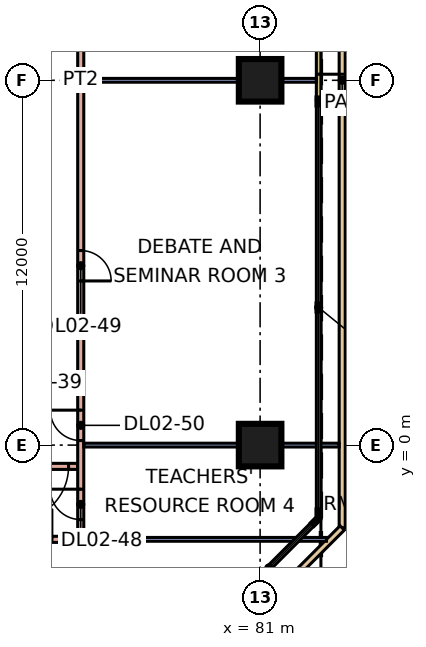
"""IFC4 building model, lengths in metres.
Left out: names, types, materials, properties, quantities, classifications, styles, units other than length and angle.
Written with IfcOpenShell. Run it as: python <this file> out.ifc"""

import sys

from ifc_helpers import new_model, si_unit, direction, frame, frame_2d, origin, origin_2d, place, context, subcontext, project, spatial, rectangle, extrude, element, fill, save


model = new_model("IFC4")
c1 = context("Model", 3, precision=1e-05, world=origin(), true_north=direction((0.0, 1.0)))
c2 = subcontext(c1, "Body", "Model", "MODEL_VIEW")
j1 = project(units=[si_unit("LENGTHUNIT", "METRE"), si_unit("PLANEANGLEUNIT", "RADIAN")], contexts=[c1])
p1 = place(None, origin())
s1 = spatial("IfcSite", under=j1, at=p1, CompositionType="ELEMENT")
p2 = place(p1, origin())
s2 = spatial("IfcBuilding", under=s1, at=p2, CompositionType="ELEMENT")
p3 = place(p2, frame((0.0, 0.0, 12.0)))
s3 = spatial("IfcBuildingStorey", under=s2, at=p3, CompositionType="ELEMENT", Elevation=12.0)
for number, where, z_axis, x_axis in (
    (1, (81.0, 0.0, 0.0), (0.0, 0.0, 1.0), (1.0, 0.0, 0.0)),
    (2, (81.0, 12.0, 0.0), (0.0, 0.0, 1.0), (1.0, 0.0, 0.0)),
):
    element("IfcColumn", number, at=place(p3, frame(where, z_axis=z_axis, x_axis=x_axis)), inside=s3, PredefinedType="COLUMN", context=c2, shape_type="SweptSolid", body=[
        extrude(rectangle(XDim=1.4, YDim=1.4, at=origin_2d()), origin(), (0.0, 0.0, 1.0), 4.8),
    ])
p4 = place(p3, frame((82.925, 11.35, 0.0), z_axis=(0.0, 0.0, 1.0), x_axis=(0.0, 1.0, 0.0)))
e3 = element("IfcWall", 3, at=p4, inside=s3, PredefinedType="SOLIDWALL", context=c2, shape_type="SweptSolid", body=[
    extrude(rectangle(XDim=3.0, YDim=0.15, at=frame_2d((1.5, 0.0))), origin(), (0.0, 0.0, 1.0), 4.4),
])
p5 = place(p4, frame((0.85, 0.0, 0.0)))
e4 = element("IfcOpeningElement", 4, at=p5, cuts=e3, PredefinedType="OPENING", context=c2, shape_type="SweptSolid", body=[
    extrude(rectangle(XDim=1.8, YDim=2.4, at=frame_2d((0.9, 1.2))), frame((0.0, 0.085, 0.0), z_axis=(0.0, -1.0, 0.0), x_axis=(1.0, 0.0, 0.0)), (0.0, 0.0, 1.0), 0.17),
])
p6 = place(p3, frame((83.7, 26.725, 0.0), z_axis=(0.0, 0.0, 1.0), x_axis=(0.0, -1.0, 0.0)))
e5 = element("IfcWall", 5, at=p6, inside=s3, PredefinedType="PARAPET", context=c2, shape_type="SweptSolid", body=[
    extrude(rectangle(XDim=29.45, YDim=0.2, at=frame_2d((14.725, 0.0))), origin(), (0.0, 0.0, 1.0), 0.5),
])
p7 = place(p3, frame((83.7, -2.725, 0.0), z_axis=(0.0, 0.0, 1.0), x_axis=(-0.707106781187, -0.707106781187, 0.0)))
e6 = element("IfcWall", 6, at=p7, inside=s3, PredefinedType="PARAPET", context=c2, shape_type="SweptSolid", body=[
    extrude(rectangle(XDim=12.692, YDim=0.2, at=frame_2d((6.346, 0.0))), origin(), (0.0, 0.0, 1.0), 0.5),
])
p8 = place(p3, frame((-0.184, -3.1, 0.0), z_axis=(0.0, 0.0, 1.0), x_axis=(1.0, 0.0, 0.0)))
e7 = element("IfcWall", 7, at=p8, inside=s3, PredefinedType="PARTITIONING", context=c2, shape_type="SweptSolid", body=[
    extrude(rectangle(XDim=75.284, YDim=0.2, at=frame_2d((37.642, 0.0))), origin(), (0.0, 0.0, 1.0), 4.4),
])
p9 = place(p8, frame((6.105, 0.0, 0.0)))
e8 = element("IfcOpeningElement", 8, at=p9, cuts=e7, PredefinedType="OPENING", context=c2, shape_type="SweptSolid", body=[
    extrude(rectangle(XDim=1.0, YDim=2.1, at=frame_2d((0.5, 1.05))), frame((0.0, 0.11, 0.0), z_axis=(0.0, -1.0, 0.0), x_axis=(1.0, 0.0, 0.0)), (0.0, 0.0, 1.0), 0.22),
])
p10 = place(p8, frame((17.584, 0.0, 0.0)))
e9 = element("IfcOpeningElement", 9, at=p10, cuts=e7, PredefinedType="OPENING", context=c2, shape_type="SweptSolid", body=[
    extrude(rectangle(XDim=1.0, YDim=2.1, at=frame_2d((0.5, 1.05))), frame((0.0, 0.11, 0.0), z_axis=(0.0, -1.0, 0.0), x_axis=(1.0, 0.0, 0.0)), (0.0, 0.0, 1.0), 0.22),
])
p11 = place(p8, frame((12.334, 0.0, 0.0)))
e10 = element("IfcOpeningElement", 10, at=p11, cuts=e7, PredefinedType="OPENING", context=c2, shape_type="SweptSolid", body=[
    extrude(rectangle(XDim=1.0, YDim=2.1, at=frame_2d((0.5, 1.05))), frame((0.0, 0.11, 0.0), z_axis=(0.0, -1.0, 0.0), x_axis=(1.0, 0.0, 0.0)), (0.0, 0.0, 1.0), 0.22),
])
p12 = place(p8, frame((29.584, 0.0, 0.0)))
e11 = element("IfcOpeningElement", 11, at=p12, cuts=e7, PredefinedType="OPENING", context=c2, shape_type="SweptSolid", body=[
    extrude(rectangle(XDim=1.0, YDim=2.1, at=frame_2d((0.5, 1.05))), frame((0.0, 0.11, 0.0), z_axis=(0.0, -1.0, 0.0), x_axis=(1.0, 0.0, 0.0)), (0.0, 0.0, 1.0), 0.22),
])
p13 = place(p8, frame((24.334, 0.0, 0.0)))
e12 = element("IfcOpeningElement", 12, at=p13, cuts=e7, PredefinedType="OPENING", context=c2, shape_type="SweptSolid", body=[
    extrude(rectangle(XDim=1.0, YDim=2.1, at=frame_2d((0.5, 1.05))), frame((0.0, 0.11, 0.0), z_axis=(0.0, -1.0, 0.0), x_axis=(1.0, 0.0, 0.0)), (0.0, 0.0, 1.0), 0.22),
])
p14 = place(p8, frame((40.084, 0.0, 0.0)))
e13 = element("IfcOpeningElement", 13, at=p14, cuts=e7, PredefinedType="OPENING", context=c2, shape_type="SweptSolid", body=[
    extrude(rectangle(XDim=1.0, YDim=2.1, at=frame_2d((0.5, 1.05))), frame((0.0, 0.11, 0.0), z_axis=(0.0, -1.0, 0.0), x_axis=(1.0, 0.0, 0.0)), (0.0, 0.0, 1.0), 0.22),
])
p15 = place(p8, frame((49.084, 0.0, 0.0)))
e14 = element("IfcOpeningElement", 14, at=p15, cuts=e7, PredefinedType="OPENING", context=c2, shape_type="SweptSolid", body=[
    extrude(rectangle(XDim=1.0, YDim=2.1, at=frame_2d((0.5, 1.05))), frame((0.0, 0.11, 0.0), z_axis=(0.0, -1.0, 0.0), x_axis=(1.0, 0.0, 0.0)), (0.0, 0.0, 1.0), 0.22),
])
p16 = place(p8, frame((58.084, 0.0, 0.0)))
e15 = element("IfcOpeningElement", 15, at=p16, cuts=e7, PredefinedType="OPENING", context=c2, shape_type="SweptSolid", body=[
    extrude(rectangle(XDim=1.0, YDim=2.1, at=frame_2d((0.5, 1.05))), frame((0.0, 0.11, 0.0), z_axis=(0.0, -1.0, 0.0), x_axis=(1.0, 0.0, 0.0)), (0.0, 0.0, 1.0), 0.22),
])
p17 = place(p8, frame((67.084, 0.0, 0.0)))
e16 = element("IfcOpeningElement", 16, at=p17, cuts=e7, PredefinedType="OPENING", context=c2, shape_type="SweptSolid", body=[
    extrude(rectangle(XDim=1.0, YDim=2.1, at=frame_2d((0.5, 1.05))), frame((0.0, 0.11, 0.0), z_axis=(0.0, -1.0, 0.0), x_axis=(1.0, 0.0, 0.0)), (0.0, 0.0, 1.0), 0.22),
])
p18 = place(p8, frame((73.334, 0.0, 0.0)))
e17 = element("IfcOpeningElement", 17, at=p18, cuts=e7, PredefinedType="OPENING", context=c2, shape_type="SweptSolid", body=[
    extrude(rectangle(XDim=1.0, YDim=2.1, at=frame_2d((0.5, 1.05))), frame((0.0, 0.11, 0.0), z_axis=(0.0, -1.0, 0.0), x_axis=(1.0, 0.0, 0.0)), (0.0, 0.0, 1.0), 0.22),
])
p19 = place(p3, frame((54.0, -0.7, 0.0), z_axis=(0.0, 0.0, 1.0), x_axis=(1.0, 0.0, 0.0)))
e18 = element("IfcWall", 18, at=p19, inside=s3, PredefinedType="PARTITIONING", context=c2, shape_type="SweptSolid", body=[
    extrude(rectangle(XDim=21.0, YDim=0.2, at=frame_2d((10.5, 0.0))), origin(), (0.0, 0.0, 1.0), 4.4),
])
p20 = place(p19, frame((4.1, 0.0, 0.0)))
e19 = element("IfcOpeningElement", 19, at=p20, cuts=e18, PredefinedType="OPENING", context=c2, shape_type="SweptSolid", body=[
    extrude(rectangle(XDim=1.0, YDim=2.1, at=frame_2d((0.5, 1.05))), frame((0.0, 0.11, 0.0), z_axis=(0.0, -1.0, 0.0), x_axis=(1.0, 0.0, 0.0)), (0.0, 0.0, 1.0), 0.22),
])
p21 = place(p19, frame((18.9, 0.0, 0.0)))
e20 = element("IfcOpeningElement", 20, at=p21, cuts=e18, PredefinedType="OPENING", context=c2, shape_type="SweptSolid", body=[
    extrude(rectangle(XDim=1.8, YDim=2.1, at=frame_2d((0.9, 1.05))), frame((0.0, 0.11, 0.0), z_axis=(0.0, -1.0, 0.0), x_axis=(1.0, 0.0, 0.0)), (0.0, 0.0, 1.0), 0.22),
])
p22 = place(p3, frame((75.1, -3.1, 0.0), z_axis=(0.0, 0.0, 1.0), x_axis=(1.0, 0.0, 0.0)))
e21 = element("IfcWall", 21, at=p22, inside=s3, PredefinedType="PARTITIONING", context=c2, shape_type="SweptSolid", body=[
    extrude(rectangle(XDim=8.083, YDim=0.125, at=frame_2d((4.042, 0.0))), origin(), (0.0, 0.0, 1.0), 4.4),
])
p23 = place(p3, frame((75.1, -3.0, 0.0), z_axis=(0.0, 0.0, 1.0), x_axis=(0.0, 1.0, 0.0)))
e22 = element("IfcWall", 22, at=p23, inside=s3, PredefinedType="PARTITIONING", context=c2, shape_type="SweptSolid", body=[
    extrude(rectangle(XDim=30.0, YDim=0.2, at=frame_2d((15.0, 0.0))), origin(), (0.0, 0.0, 1.0), 4.4),
])
p24 = place(p23, frame((0.55, 0.0, 0.0)))
e23 = element("IfcOpeningElement", 23, at=p24, cuts=e22, PredefinedType="OPENING", context=c2, shape_type="SweptSolid", body=[
    extrude(rectangle(XDim=1.0, YDim=2.1, at=frame_2d((0.5, 1.05))), frame((0.0, 0.11, 0.0), z_axis=(0.0, -1.0, 0.0), x_axis=(1.0, 0.0, 0.0)), (0.0, 0.0, 1.0), 0.22),
])
p25 = place(p23, frame((8.4, 0.0, 0.0)))
e24 = element("IfcOpeningElement", 24, at=p25, cuts=e22, PredefinedType="OPENING", context=c2, shape_type="SweptSolid", body=[
    extrude(rectangle(XDim=1.0, YDim=2.1, at=frame_2d((0.5, 1.05))), frame((0.0, 0.11, 0.0), z_axis=(0.0, -1.0, 0.0), x_axis=(1.0, 0.0, 0.0)), (0.0, 0.0, 1.0), 0.22),
])
p26 = place(p23, frame((3.15, 0.0, 0.0)))
e25 = element("IfcOpeningElement", 25, at=p26, cuts=e22, PredefinedType="OPENING", context=c2, shape_type="SweptSolid", body=[
    extrude(rectangle(XDim=1.0, YDim=2.1, at=frame_2d((0.5, 1.05))), frame((0.0, 0.11, 0.0), z_axis=(0.0, -1.0, 0.0), x_axis=(1.0, 0.0, 0.0)), (0.0, 0.0, 1.0), 0.22),
])
p27 = place(p23, frame((22.25, 0.0, 0.0)))
e26 = element("IfcOpeningElement", 26, at=p27, cuts=e22, PredefinedType="OPENING", context=c2, shape_type="SweptSolid", body=[
    extrude(rectangle(XDim=1.0, YDim=2.1, at=frame_2d((0.5, 1.05))), frame((0.0, 0.11, 0.0), z_axis=(0.0, -1.0, 0.0), x_axis=(1.0, 0.0, 0.0)), (0.0, 0.0, 1.0), 0.22),
])
p28 = place(p23, frame((18.75, 0.0, 0.0)))
e27 = element("IfcOpeningElement", 27, at=p28, cuts=e22, PredefinedType="OPENING", context=c2, shape_type="SweptSolid", body=[
    extrude(rectangle(XDim=1.0, YDim=2.1, at=frame_2d((0.5, 1.05))), frame((0.0, 0.11, 0.0), z_axis=(0.0, -1.0, 0.0), x_axis=(1.0, 0.0, 0.0)), (0.0, 0.0, 1.0), 0.22),
])
p29 = place(p23, frame((28.35, 0.0, 0.0)))
e28 = element("IfcOpeningElement", 28, at=p29, cuts=e22, PredefinedType="OPENING", context=c2, shape_type="SweptSolid", body=[
    extrude(rectangle(XDim=1.0, YDim=2.1, at=frame_2d((0.5, 1.05))), frame((0.0, 0.11, 0.0), z_axis=(0.0, -1.0, 0.0), x_axis=(1.0, 0.0, 0.0)), (0.0, 0.0, 1.0), 0.22),
])
p30 = place(p3, frame((75.2, 0.0, 0.0), z_axis=(0.0, 0.0, 1.0), x_axis=(1.0, 0.0, 0.0)))
e29 = element("IfcWall", 29, at=p30, inside=s3, PredefinedType="PARTITIONING", context=c2, shape_type="SweptSolid", body=[
    extrude(rectangle(XDim=8.4, YDim=0.125, at=frame_2d((4.2, 0.0))), origin(), (0.0, 0.0, 1.0), 4.4),
])
p31 = place(p3, frame((75.2, 12.0, 0.0), z_axis=(0.0, 0.0, 1.0), x_axis=(1.0, 0.0, 0.0)))
e30 = element("IfcWall", 30, at=p31, inside=s3, PredefinedType="PARTITIONING", context=c2, shape_type="SweptSolid", body=[
    extrude(rectangle(XDim=7.651, YDim=0.125, at=frame_2d((3.826, 0.0))), origin(), (0.0, 0.0, 1.0), 4.4),
])
p32 = place(p5, frame((1.8, 0.0, 0.0), z_axis=(0.0, 0.0, 1.0), x_axis=(-1.0, 0.0, 0.0)))
e31 = element("IfcDoor", 31, at=p32, inside=s3, OperationType="DOUBLE_DOOR_SINGLE_SWING", PredefinedType="DOOR", context=c2, shape_type="SweptSolid", body=[
    extrude(rectangle(XDim=1.8, YDim=2.4, at=frame_2d((0.9, 1.2))), frame((0.0, 0.025, 0.0), z_axis=(0.0, -1.0, 0.0), x_axis=(1.0, 0.0, 0.0)), (0.0, 0.0, 1.0), 0.05),
])
fill(e4, e31)
p33 = place(p21, frame((1.8, 0.0, 0.0), z_axis=(0.0, 0.0, 1.0), x_axis=(-1.0, 0.0, 0.0)))
e32 = element("IfcDoor", 32, at=p33, inside=s3, OperationType="DOUBLE_DOOR_SINGLE_SWING", PredefinedType="DOOR", context=c2, shape_type="SweptSolid", body=[
    extrude(rectangle(XDim=1.8, YDim=2.1, at=frame_2d((0.9, 1.05))), frame((0.0, 0.025, 0.0), z_axis=(0.0, -1.0, 0.0), x_axis=(1.0, 0.0, 0.0)), (0.0, 0.0, 1.0), 0.05),
])
fill(e20, e32)
p34 = place(p24, frame((1.0, 0.0, 0.0), z_axis=(0.0, 0.0, 1.0), x_axis=(-1.0, 0.0, 0.0)))
e33 = element("IfcDoor", 33, at=p34, inside=s3, OperationType="SINGLE_SWING_RIGHT", PredefinedType="DOOR", context=c2, shape_type="SweptSolid", body=[
    extrude(rectangle(XDim=1.0, YDim=2.1, at=frame_2d((0.5, 1.05))), frame((0.0, 0.025, 0.0), z_axis=(0.0, -1.0, 0.0), x_axis=(1.0, 0.0, 0.0)), (0.0, 0.0, 1.0), 0.05),
])
fill(e23, e33)
p35 = place(p25, frame((1.0, 0.0, 0.0), z_axis=(0.0, 0.0, 1.0), x_axis=(-1.0, 0.0, 0.0)))
e34 = element("IfcDoor", 34, at=p35, inside=s3, OperationType="SINGLE_SWING_LEFT", PredefinedType="DOOR", context=c2, shape_type="SweptSolid", body=[
    extrude(rectangle(XDim=1.0, YDim=2.1, at=frame_2d((0.5, 1.05))), frame((0.0, 0.025, 0.0), z_axis=(0.0, -1.0, 0.0), x_axis=(1.0, 0.0, 0.0)), (0.0, 0.0, 1.0), 0.05),
])
fill(e24, e34)
p36 = place(p26, frame((1.0, 0.0, 0.0), z_axis=(0.0, 0.0, 1.0), x_axis=(-1.0, 0.0, 0.0)))
e35 = element("IfcDoor", 35, at=p36, inside=s3, OperationType="SINGLE_SWING_RIGHT", PredefinedType="DOOR", context=c2, shape_type="SweptSolid", body=[
    extrude(rectangle(XDim=1.0, YDim=2.1, at=frame_2d((0.5, 1.05))), frame((0.0, 0.025, 0.0), z_axis=(0.0, -1.0, 0.0), x_axis=(1.0, 0.0, 0.0)), (0.0, 0.0, 1.0), 0.05),
])
fill(e25, e35)
save(model, sys.argv[1])
